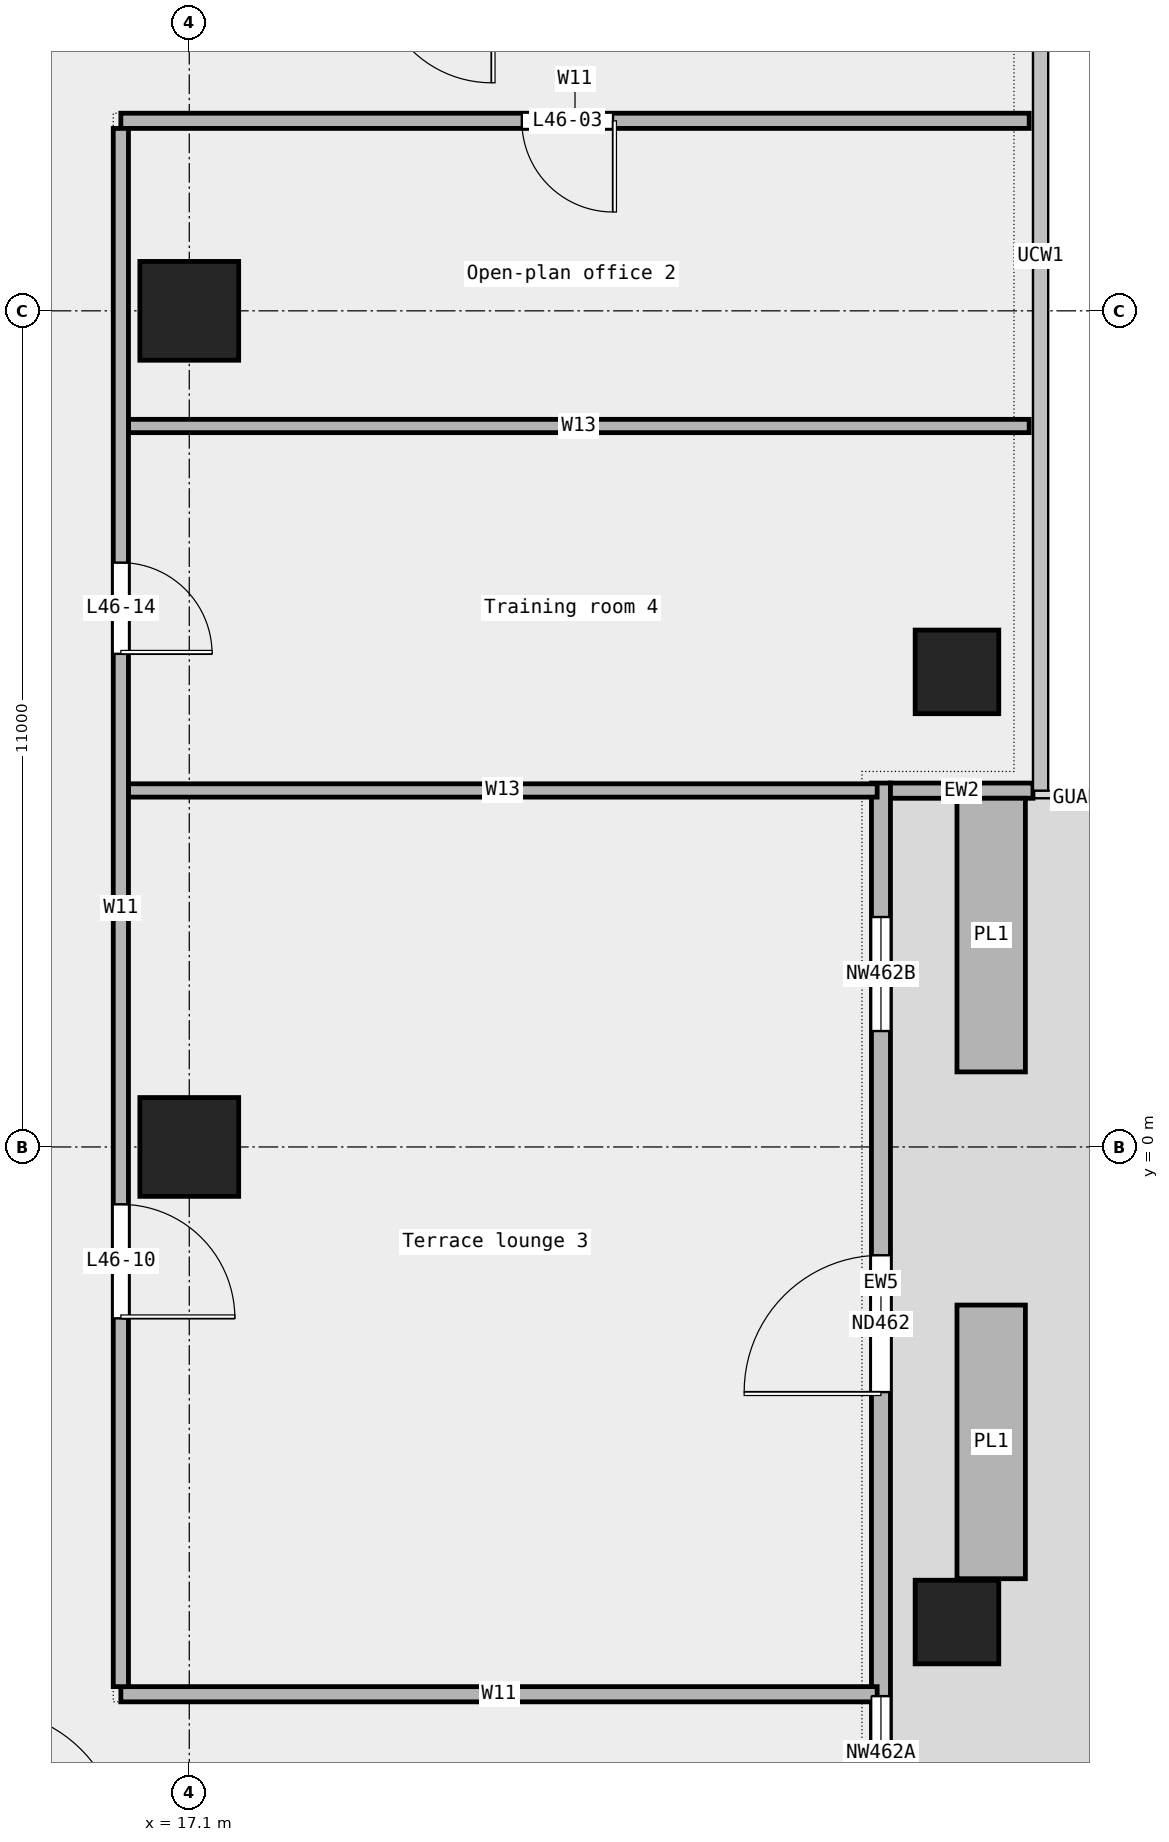
"""IFC4 building model, lengths in metres.
Left out: names, types, materials, properties, quantities, classifications, styles, units other than length and angle.
Written with IfcOpenShell. Run it as: python <this file> out.ifc"""

import sys

from ifc_helpers import new_model, si_unit, direction, frame, frame_2d, origin, origin_2d, place, context, subcontext, project, spatial, rectangle, extrude, element, fill, save


model = new_model("IFC4")
c1 = context("Model", 3, precision=1e-05, world=origin(), true_north=direction((0.0, 1.0)))
c2 = subcontext(c1, "Body", "Model", "MODEL_VIEW")
j1 = project(units=[si_unit("LENGTHUNIT", "METRE"), si_unit("PLANEANGLEUNIT", "RADIAN")], contexts=[c1])
p1 = place(None, origin())
s1 = spatial("IfcSite", under=j1, at=p1, CompositionType="ELEMENT")
p2 = place(p1, origin())
s2 = spatial("IfcBuilding", under=s1, at=p2, CompositionType="ELEMENT")
p3 = place(p2, frame((0.0, 0.0, 219.0)))
s3 = spatial("IfcBuildingStorey", under=s2, at=p3, CompositionType="ELEMENT", Elevation=219.0)
for number, where, z_axis, x_axis in (
    (1, (27.2, -6.25, 0.0), (0.0, 0.0, 1.0), (1.0, 0.0, 0.0)),
    (2, (27.2, 6.25, 0.0), (0.0, 0.0, 1.0), (1.0, 0.0, 0.0)),
):
    element("IfcColumn", number, at=place(p3, frame(where, z_axis=z_axis, x_axis=x_axis)), inside=s3, PredefinedType="COLUMN", context=c2, shape_type="SweptSolid", body=[
        extrude(rectangle(XDim=1.1, YDim=1.1, at=origin_2d()), origin(), (0.0, 0.0, 1.0), 3.6),
    ])
for number, where, z_axis, x_axis in (
    (3, (17.1, 0.0, 0.0), (0.0, 0.0, 1.0), (1.0, 0.0, 0.0)),
    (4, (17.1, 11.0, 0.0), (0.0, 0.0, 1.0), (1.0, 0.0, 0.0)),
):
    element("IfcColumn", number, at=place(p3, frame(where, z_axis=z_axis, x_axis=x_axis)), inside=s3, PredefinedType="COLUMN", context=c2, shape_type="SweptSolid", body=[
        extrude(rectangle(XDim=1.3, YDim=1.3, at=origin_2d()), origin(), (0.0, 0.0, 1.0), 3.6),
    ])
p4 = place(p3, frame((26.2, -9.475, 0.0), z_axis=(0.0, 0.0, 1.0), x_axis=(0.0, 1.0, 0.0)))
e5 = element("IfcWall", 5, at=p4, inside=s3, PredefinedType="STANDARD", context=c2, shape_type="SweptSolid", body=[
    extrude(rectangle(XDim=14.263, YDim=0.25, at=frame_2d((7.131, 0.0))), origin(), (0.0, 0.0, 1.0), 3.6),
])
p5 = place(p4, frame((0.75, 0.0, 0.45)))
e6 = element("IfcOpeningElement", 6, at=p5, cuts=e5, PredefinedType="OPENING", context=c2, shape_type="SweptSolid", body=[
    extrude(rectangle(XDim=1.5, YDim=2.4, at=frame_2d((0.75, 1.2))), frame((0.0, 0.137, 0.0), z_axis=(0.0, -1.0, 0.0), x_axis=(1.0, 0.0, 0.0)), (0.0, 0.0, 1.0), 0.274),
])
p6 = place(p4, frame((6.25, 0.0, 0.0)))
e7 = element("IfcOpeningElement", 7, at=p6, cuts=e5, PredefinedType="OPENING", context=c2, shape_type="SweptSolid", body=[
    extrude(rectangle(XDim=1.8, YDim=2.4, at=frame_2d((0.9, 1.2))), frame((0.0, 0.137, 0.0), z_axis=(0.0, -1.0, 0.0), x_axis=(1.0, 0.0, 0.0)), (0.0, 0.0, 1.0), 0.274),
])
p7 = place(p4, frame((11.0, 0.0, 0.45)))
e8 = element("IfcOpeningElement", 8, at=p7, cuts=e5, PredefinedType="OPENING", context=c2, shape_type="SweptSolid", body=[
    extrude(rectangle(XDim=1.5, YDim=2.4, at=frame_2d((0.75, 1.2))), frame((0.0, 0.137, 0.0), z_axis=(0.0, -1.0, 0.0), x_axis=(1.0, 0.0, 0.0)), (0.0, 0.0, 1.0), 0.274),
])
p8 = place(p3, frame((28.2, 4.688, 0.0), z_axis=(0.0, 0.0, 1.0), x_axis=(-1.0, 0.0, 0.0)))
e9 = element("IfcWall", 9, at=p8, inside=s3, PredefinedType="STANDARD", context=c2, shape_type="SweptSolid", body=[
    extrude(rectangle(XDim=1.875, YDim=0.2, at=frame_2d((0.938, 0.0))), origin(), (0.0, 0.0, 1.0), 3.6),
])
for number, where, z_axis, x_axis in (
    (10, (27.65, -5.68, 0.0), (0.0, 0.0, 1.0), (0.0, 1.0, 0.0)),
    (11, (27.65, 0.988, 0.0), (0.0, 0.0, 1.0), (0.0, 1.0, 0.0)),
):
    element("IfcWall", number, at=place(p3, frame(where, z_axis=z_axis, x_axis=x_axis)), inside=s3, PredefinedType="STANDARD", context=c2, shape_type="SweptSolid", body=[
        extrude(rectangle(XDim=3.6, YDim=0.9, at=frame_2d((1.8, 0.0))), origin(), (0.0, 0.0, 1.0), 0.7),
    ])
p9 = place(p3, frame((16.2, -7.2, 0.0), z_axis=(0.0, 0.0, 1.0), x_axis=(1.0, 0.0, 0.0)))
e12 = element("IfcWall", 12, at=p9, inside=s3, PredefinedType="PARTITIONING", context=c2, shape_type="SweptSolid", body=[
    extrude(rectangle(XDim=9.95, YDim=0.2, at=frame_2d((4.975, 0.0))), origin(), (0.0, 0.0, 1.0), 3.6),
])
p10 = place(p3, frame((16.3, 4.69, 0.0), z_axis=(0.0, 0.0, 1.0), x_axis=(1.0, 0.0, 0.0)))
e13 = element("IfcWall", 13, at=p10, inside=s3, PredefinedType="PARTITIONING", context=c2, shape_type="SweptSolid", body=[
    extrude(rectangle(XDim=9.85, YDim=0.175, at=frame_2d((4.925, 0.0))), origin(), (0.0, 0.0, 1.0), 3.6),
])
p11 = place(p3, frame((16.3, 9.485, 0.0), z_axis=(0.0, 0.0, 1.0), x_axis=(1.0, 0.0, 0.0)))
e14 = element("IfcWall", 14, at=p11, inside=s3, PredefinedType="PARTITIONING", context=c2, shape_type="SweptSolid", body=[
    extrude(rectangle(XDim=11.85, YDim=0.175, at=frame_2d((5.925, 0.0))), origin(), (0.0, 0.0, 1.0), 3.6),
])
p12 = place(p3, frame((16.2, 13.5, 0.0), z_axis=(0.0, 0.0, 1.0), x_axis=(1.0, 0.0, 0.0)))
e15 = element("IfcWall", 15, at=p12, inside=s3, PredefinedType="PARTITIONING", context=c2, shape_type="SweptSolid", body=[
    extrude(rectangle(XDim=11.95, YDim=0.2, at=frame_2d((5.975, 0.0))), origin(), (0.0, 0.0, 1.0), 3.6),
])
p13 = place(p12, frame((5.275, 0.0, 0.0)))
e16 = element("IfcOpeningElement", 16, at=p13, cuts=e15, PredefinedType="OPENING", context=c2, shape_type="SweptSolid", body=[
    extrude(rectangle(XDim=1.2, YDim=2.1, at=frame_2d((0.6, 1.05))), frame((0.0, 0.112, 0.0), z_axis=(0.0, -1.0, 0.0), x_axis=(1.0, 0.0, 0.0)), (0.0, 0.0, 1.0), 0.224),
])
p14 = place(p3, frame((16.2, -7.1, 0.0), z_axis=(0.0, 0.0, 1.0), x_axis=(0.0, 1.0, 0.0)))
e17 = element("IfcWall", 17, at=p14, inside=s3, PredefinedType="PARTITIONING", context=c2, shape_type="SweptSolid", body=[
    extrude(rectangle(XDim=20.5, YDim=0.2, at=frame_2d((10.25, 0.0))), origin(), (0.0, 0.0, 1.0), 3.6),
])
p15 = place(p14, frame((4.845, 0.0, 0.0)))
e18 = element("IfcOpeningElement", 18, at=p15, cuts=e17, PredefinedType="OPENING", context=c2, shape_type="SweptSolid", body=[
    extrude(rectangle(XDim=1.5, YDim=2.1, at=frame_2d((0.75, 1.05))), frame((0.0, 0.112, 0.0), z_axis=(0.0, -1.0, 0.0), x_axis=(1.0, 0.0, 0.0)), (0.0, 0.0, 1.0), 0.224),
])
p16 = place(p14, frame((13.587, 0.0, 0.0)))
e19 = element("IfcOpeningElement", 19, at=p16, cuts=e17, PredefinedType="OPENING", context=c2, shape_type="SweptSolid", body=[
    extrude(rectangle(XDim=1.2, YDim=2.1, at=frame_2d((0.6, 1.05))), frame((0.0, 0.112, 0.0), z_axis=(0.0, -1.0, 0.0), x_axis=(1.0, 0.0, 0.0)), (0.0, 0.0, 1.0), 0.224),
])
p17 = place(p5, origin())
e20 = element("IfcWindow", 20, at=p17, inside=s3, PartitioningType="SINGLE_PANEL", PredefinedType="WINDOW", context=c2, shape_type="SweptSolid", body=[
    extrude(rectangle(XDim=1.5, YDim=2.4, at=frame_2d((0.75, 1.2))), frame((0.0, 0.03, 0.0), z_axis=(0.0, -1.0, 0.0), x_axis=(1.0, 0.0, 0.0)), (0.0, 0.0, 1.0), 0.06),
])
fill(e6, e20)
p18 = place(p6, origin())
e21 = element("IfcDoor", 21, at=p18, inside=s3, OperationType="DOUBLE_DOOR_SINGLE_SWING", PredefinedType="DOOR", context=c2, shape_type="SweptSolid", body=[
    extrude(rectangle(XDim=1.8, YDim=2.4, at=frame_2d((0.9, 1.2))), frame((0.0, 0.025, 0.0), z_axis=(0.0, -1.0, 0.0), x_axis=(1.0, 0.0, 0.0)), (0.0, 0.0, 1.0), 0.05),
])
fill(e7, e21)
p19 = place(p7, origin())
e22 = element("IfcWindow", 22, at=p19, inside=s3, PartitioningType="SINGLE_PANEL", PredefinedType="WINDOW", context=c2, shape_type="SweptSolid", body=[
    extrude(rectangle(XDim=1.5, YDim=2.4, at=frame_2d((0.75, 1.2))), frame((0.0, 0.03, 0.0), z_axis=(0.0, -1.0, 0.0), x_axis=(1.0, 0.0, 0.0)), (0.0, 0.0, 1.0), 0.06),
])
fill(e8, e22)
p20 = place(p13, origin())
e23 = element("IfcDoor", 23, at=p20, inside=s3, OperationType="SINGLE_SWING_LEFT", PredefinedType="DOOR", context=c2, shape_type="SweptSolid", body=[
    extrude(rectangle(XDim=1.2, YDim=2.1, at=frame_2d((0.6, 1.05))), frame((0.0, 0.025, 0.0), z_axis=(0.0, -1.0, 0.0), x_axis=(1.0, 0.0, 0.0)), (0.0, 0.0, 1.0), 0.05),
])
fill(e16, e23)
p21 = place(p15, origin())
e24 = element("IfcDoor", 24, at=p21, inside=s3, OperationType="DOUBLE_DOOR_SINGLE_SWING", PredefinedType="DOOR", context=c2, shape_type="SweptSolid", body=[
    extrude(rectangle(XDim=1.5, YDim=2.1, at=frame_2d((0.75, 1.05))), frame((0.0, 0.025, 0.0), z_axis=(0.0, -1.0, 0.0), x_axis=(1.0, 0.0, 0.0)), (0.0, 0.0, 1.0), 0.05),
])
fill(e18, e24)
p22 = place(p16, origin())
e25 = element("IfcDoor", 25, at=p22, inside=s3, OperationType="SINGLE_SWING_RIGHT", PredefinedType="DOOR", context=c2, shape_type="SweptSolid", body=[
    extrude(rectangle(XDim=1.2, YDim=2.1, at=frame_2d((0.6, 1.05))), frame((0.0, 0.025, 0.0), z_axis=(0.0, -1.0, 0.0), x_axis=(1.0, 0.0, 0.0)), (0.0, 0.0, 1.0), 0.05),
])
fill(e19, e25)
save(model, sys.argv[1])
